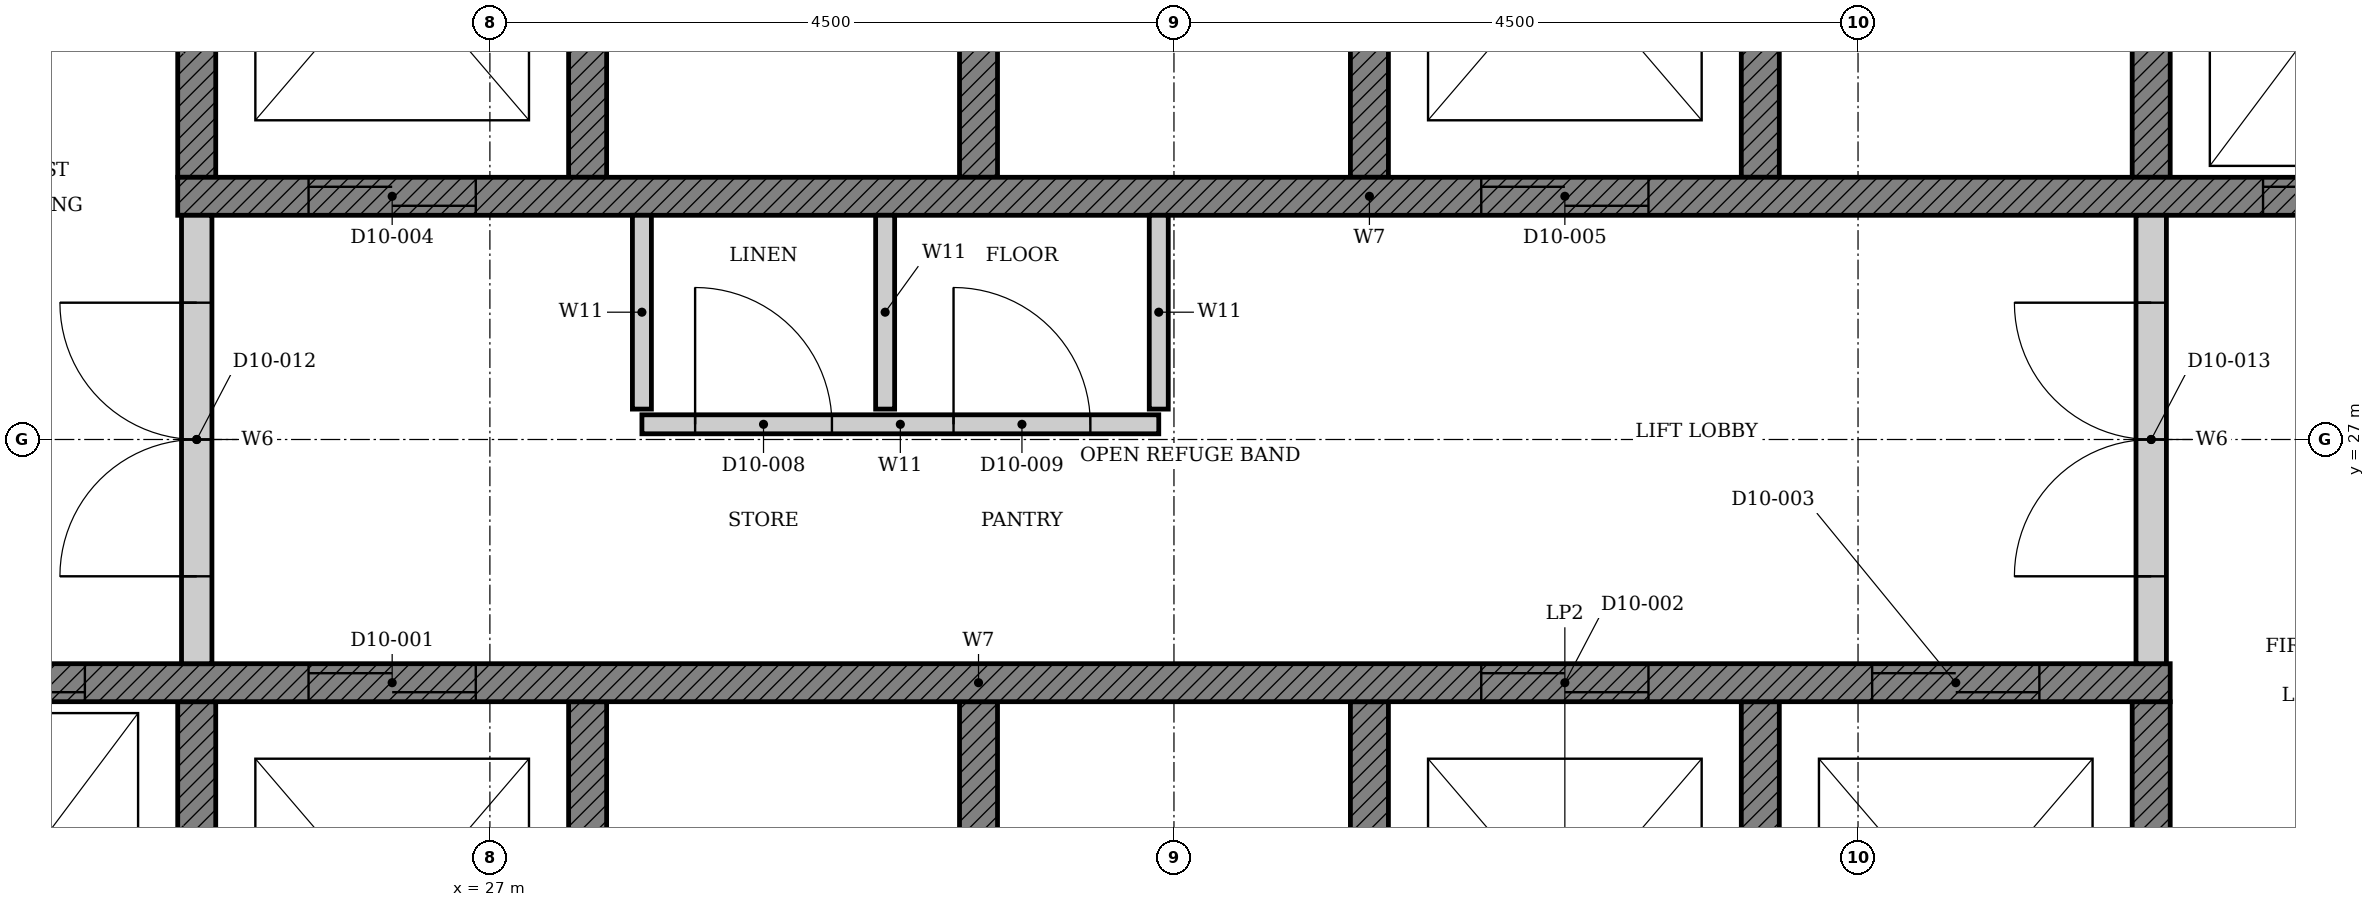
"""IFC4 building model, lengths in metres.
Left out: names, types, materials, properties, quantities, classifications, styles, units other than length and angle.
Written with IfcOpenShell. Run it as: python <this file> out.ifc"""

import sys

from ifc_helpers import new_model, si_unit, direction, frame, frame_2d, origin, place, context, subcontext, project, spatial, polyline, rectangle, outline, extrude, element, fill, save


model = new_model("IFC4")
c1 = context("Model", 3, precision=1e-05, world=origin(), true_north=direction((0.0, 1.0)))
c2 = subcontext(c1, "Body", "Model", "MODEL_VIEW")
j1 = project(units=[si_unit("LENGTHUNIT", "METRE"), si_unit("PLANEANGLEUNIT", "RADIAN")], contexts=[c1])
p1 = place(None, origin())
s1 = spatial("IfcSite", under=j1, at=p1, CompositionType="ELEMENT")
p2 = place(p1, origin())
s2 = spatial("IfcBuilding", under=s1, at=p2, CompositionType="ELEMENT")
p3 = place(p2, frame((0.0, 0.0, 48.0)))
s3 = spatial("IfcBuildingStorey", under=s2, at=p3, CompositionType="ELEMENT", Elevation=48.0)
p4 = place(p3, origin())
e1 = element("IfcWall", 1, at=p4, inside=s3, PredefinedType="SHEAR", context=c2, shape_type="SweptSolid", body=[
    extrude(outline(polyline([(22.375, 22.35), (38.053, 22.35), (38.053, 25.275), (37.803, 25.275), (37.803, 22.65), (35.482, 22.65), (35.482, 25.275), (35.232, 25.275), (35.232, 22.65), (32.911, 22.65), (32.911, 25.275), (32.661, 25.275), (32.661, 22.65), (30.339, 22.65), (30.339, 25.275), (30.089, 25.275), (30.089, 22.65), (27.768, 22.65), (27.768, 25.275), (27.518, 25.275), (27.518, 22.65), (25.197, 22.65), (25.197, 25.275), (24.947, 25.275), (24.947, 22.65), (22.625, 22.65), (22.625, 25.275), (22.375, 25.275), (22.375, 22.35)])), origin(), (0.0, 0.0, 1.0), 4.5),
])
p5 = place(p3, origin())
e2 = element("IfcWall", 2, at=p5, inside=s3, PredefinedType="SHEAR", context=c2, shape_type="SweptSolid", body=[
    extrude(outline(polyline([(24.947, 28.725), (25.197, 28.725), (25.197, 31.35), (27.518, 31.35), (27.518, 28.725), (27.768, 28.725), (27.768, 31.35), (30.089, 31.35), (30.089, 28.725), (30.339, 28.725), (30.339, 31.35), (32.661, 31.35), (32.661, 28.725), (32.911, 28.725), (32.911, 31.35), (35.232, 31.35), (35.232, 28.725), (35.482, 28.725), (35.482, 31.35), (37.803, 31.35), (37.803, 28.725), (38.053, 28.725), (38.053, 31.35), (40.375, 31.35), (40.375, 28.725), (40.625, 28.725), (40.625, 31.65), (24.947, 31.65), (24.947, 28.725)])), origin(), (0.0, 0.0, 1.0), 4.5),
])
p6 = place(p3, frame((22.375, 25.4, 0.0), z_axis=(0.0, 0.0, 1.0), x_axis=(1.0, 0.0, 0.0)))
e3 = element("IfcWall", 3, at=p6, inside=s3, PredefinedType="SHEAR", context=c2, shape_type="SweptSolid", body=[
    extrude(rectangle(XDim=15.678, YDim=0.25, at=frame_2d((7.839, 0.0))), origin(), (0.0, 0.0, 1.0), 4.5),
])
p7 = place(p6, frame((3.432, 0.0, 0.0)))
e4 = element("IfcOpeningElement", 4, at=p7, cuts=e3, PredefinedType="OPENING", context=c2, shape_type="SweptSolid", body=[
    extrude(rectangle(XDim=1.1, YDim=2.1, at=frame_2d((0.55, 1.05))), frame((0.0, 0.135, 0.0), z_axis=(0.0, -1.0, 0.0), x_axis=(1.0, 0.0, 0.0)), (0.0, 0.0, 1.0), 0.27),
])
p8 = place(p6, frame((11.146, 0.0, 0.0)))
e5 = element("IfcOpeningElement", 5, at=p8, cuts=e3, PredefinedType="OPENING", context=c2, shape_type="SweptSolid", body=[
    extrude(rectangle(XDim=1.1, YDim=2.1, at=frame_2d((0.55, 1.05))), frame((0.0, 0.135, 0.0), z_axis=(0.0, -1.0, 0.0), x_axis=(1.0, 0.0, 0.0)), (0.0, 0.0, 1.0), 0.27),
])
p9 = place(p6, frame((13.718, 0.0, 0.0)))
e6 = element("IfcOpeningElement", 6, at=p9, cuts=e3, PredefinedType="OPENING", context=c2, shape_type="SweptSolid", body=[
    extrude(rectangle(XDim=1.1, YDim=2.1, at=frame_2d((0.55, 1.05))), frame((0.0, 0.135, 0.0), z_axis=(0.0, -1.0, 0.0), x_axis=(1.0, 0.0, 0.0)), (0.0, 0.0, 1.0), 0.27),
])
p10 = place(p6, frame((0.861, 0.0, 0.0)))
e7 = element("IfcOpeningElement", 7, at=p10, cuts=e3, PredefinedType="OPENING", context=c2, shape_type="SweptSolid", body=[
    extrude(rectangle(XDim=1.1, YDim=2.1, at=frame_2d((0.55, 1.05))), frame((0.0, 0.135, 0.0), z_axis=(0.0, -1.0, 0.0), x_axis=(1.0, 0.0, 0.0)), (0.0, 0.0, 1.0), 0.27),
])
p11 = place(p3, frame((24.947, 28.6, 0.0), z_axis=(0.0, 0.0, 1.0), x_axis=(1.0, 0.0, 0.0)))
e8 = element("IfcWall", 8, at=p11, inside=s3, PredefinedType="SHEAR", context=c2, shape_type="SweptSolid", body=[
    extrude(rectangle(XDim=15.678, YDim=0.25, at=frame_2d((7.839, 0.0))), origin(), (0.0, 0.0, 1.0), 4.5),
])
p12 = place(p11, frame((0.861, 0.0, 0.0)))
e9 = element("IfcOpeningElement", 9, at=p12, cuts=e8, PredefinedType="OPENING", context=c2, shape_type="SweptSolid", body=[
    extrude(rectangle(XDim=1.1, YDim=2.1, at=frame_2d((0.55, 1.05))), frame((0.0, 0.135, 0.0), z_axis=(0.0, -1.0, 0.0), x_axis=(1.0, 0.0, 0.0)), (0.0, 0.0, 1.0), 0.27),
])
p13 = place(p11, frame((8.575, 0.0, 0.0)))
e10 = element("IfcOpeningElement", 10, at=p13, cuts=e8, PredefinedType="OPENING", context=c2, shape_type="SweptSolid", body=[
    extrude(rectangle(XDim=1.1, YDim=2.1, at=frame_2d((0.55, 1.05))), frame((0.0, 0.135, 0.0), z_axis=(0.0, -1.0, 0.0), x_axis=(1.0, 0.0, 0.0)), (0.0, 0.0, 1.0), 0.27),
])
p14 = place(p11, frame((13.718, 0.0, 0.0)))
e11 = element("IfcOpeningElement", 11, at=p14, cuts=e8, PredefinedType="OPENING", context=c2, shape_type="SweptSolid", body=[
    extrude(rectangle(XDim=1.1, YDim=2.1, at=frame_2d((0.55, 1.05))), frame((0.0, 0.135, 0.0), z_axis=(0.0, -1.0, 0.0), x_axis=(1.0, 0.0, 0.0)), (0.0, 0.0, 1.0), 0.27),
])
p15 = place(p3, frame((28.0, 27.1, 0.0), z_axis=(0.0, 0.0, 1.0), x_axis=(1.0, 0.0, 0.0)))
e12 = element("IfcWall", 12, at=p15, inside=s3, PredefinedType="PARTITIONING", context=c2, shape_type="SweptSolid", body=[
    extrude(rectangle(XDim=3.4, YDim=0.125, at=frame_2d((1.7, 0.0))), origin(), (0.0, 0.0, 1.0), 4.5),
])
p16 = place(p15, frame((0.35, 0.0, 0.0)))
e13 = element("IfcOpeningElement", 13, at=p16, cuts=e12, PredefinedType="OPENING", context=c2, shape_type="SweptSolid", body=[
    extrude(rectangle(XDim=0.9, YDim=2.1, at=frame_2d((0.45, 1.05))), frame((0.0, 0.073, 0.0), z_axis=(0.0, -1.0, 0.0), x_axis=(1.0, 0.0, 0.0)), (0.0, 0.0, 1.0), 0.145),
])
p17 = place(p15, frame((2.05, 0.0, 0.0)))
e14 = element("IfcOpeningElement", 14, at=p17, cuts=e12, PredefinedType="OPENING", context=c2, shape_type="SweptSolid", body=[
    extrude(rectangle(XDim=0.9, YDim=2.1, at=frame_2d((0.45, 1.05))), frame((0.0, 0.073, 0.0), z_axis=(0.0, -1.0, 0.0), x_axis=(1.0, 0.0, 0.0)), (0.0, 0.0, 1.0), 0.145),
])
for number, where, z_axis, x_axis in (
    (15, (28.0, 28.475, 0.0), (0.0, 0.0, 1.0), (0.0, -1.0, 0.0)),
    (16, (29.6, 28.475, 0.0), (0.0, 0.0, 1.0), (0.0, -1.0, 0.0)),
    (17, (31.4, 28.475, 0.0), (0.0, 0.0, 1.0), (0.0, -1.0, 0.0)),
):
    element("IfcWall", number, at=place(p3, frame(where, z_axis=z_axis, x_axis=x_axis)), inside=s3, PredefinedType="PARTITIONING", context=c2, shape_type="SweptSolid", body=[
        extrude(rectangle(XDim=1.275, YDim=0.125, at=frame_2d((0.638, 0.0))), origin(), (0.0, 0.0, 1.0), 4.5),
    ])
p18 = place(p3, frame((25.072, 25.525, 0.0), z_axis=(0.0, 0.0, 1.0), x_axis=(0.0, 1.0, 0.0)))
e18 = element("IfcWall", 18, at=p18, inside=s3, PredefinedType="PARTITIONING", context=c2, shape_type="SweptSolid", body=[
    extrude(rectangle(XDim=2.95, YDim=0.2, at=frame_2d((1.475, 0.0))), origin(), (0.0, 0.0, 1.0), 4.5),
])
p19 = place(p18, frame((0.575, 0.0, 0.0)))
e19 = element("IfcOpeningElement", 19, at=p19, cuts=e18, PredefinedType="OPENING", context=c2, shape_type="SweptSolid", body=[
    extrude(rectangle(XDim=1.8, YDim=2.1, at=frame_2d((0.9, 1.05))), frame((0.0, 0.11, 0.0), z_axis=(0.0, -1.0, 0.0), x_axis=(1.0, 0.0, 0.0)), (0.0, 0.0, 1.0), 0.22),
])
p20 = place(p3, frame((37.928, 25.525, 0.0), z_axis=(0.0, 0.0, 1.0), x_axis=(0.0, 1.0, 0.0)))
e20 = element("IfcWall", 20, at=p20, inside=s3, PredefinedType="PARTITIONING", context=c2, shape_type="SweptSolid", body=[
    extrude(rectangle(XDim=2.95, YDim=0.2, at=frame_2d((1.475, 0.0))), origin(), (0.0, 0.0, 1.0), 4.5),
])
p21 = place(p20, frame((0.575, 0.0, 0.0)))
e21 = element("IfcOpeningElement", 21, at=p21, cuts=e20, PredefinedType="OPENING", context=c2, shape_type="SweptSolid", body=[
    extrude(rectangle(XDim=1.8, YDim=2.1, at=frame_2d((0.9, 1.05))), frame((0.0, 0.11, 0.0), z_axis=(0.0, -1.0, 0.0), x_axis=(1.0, 0.0, 0.0)), (0.0, 0.0, 1.0), 0.22),
])
p22 = place(p7, origin())
e22 = element("IfcDoor", 22, at=p22, inside=s3, OperationType="DOUBLE_DOOR_SLIDING", PredefinedType="DOOR", context=c2, shape_type="SweptSolid", body=[
    extrude(rectangle(XDim=1.1, YDim=2.1, at=frame_2d((0.55, 1.05))), frame((0.0, 0.025, 0.0), z_axis=(0.0, -1.0, 0.0), x_axis=(1.0, 0.0, 0.0)), (0.0, 0.0, 1.0), 0.05),
])
fill(e4, e22)
p23 = place(p8, origin())
e23 = element("IfcDoor", 23, at=p23, inside=s3, OperationType="DOUBLE_DOOR_SLIDING", PredefinedType="DOOR", context=c2, shape_type="SweptSolid", body=[
    extrude(rectangle(XDim=1.1, YDim=2.1, at=frame_2d((0.55, 1.05))), frame((0.0, 0.025, 0.0), z_axis=(0.0, -1.0, 0.0), x_axis=(1.0, 0.0, 0.0)), (0.0, 0.0, 1.0), 0.05),
])
fill(e5, e23)
p24 = place(p9, origin())
e24 = element("IfcDoor", 24, at=p24, inside=s3, OperationType="DOUBLE_DOOR_SLIDING", PredefinedType="DOOR", context=c2, shape_type="SweptSolid", body=[
    extrude(rectangle(XDim=1.1, YDim=2.1, at=frame_2d((0.55, 1.05))), frame((0.0, 0.025, 0.0), z_axis=(0.0, -1.0, 0.0), x_axis=(1.0, 0.0, 0.0)), (0.0, 0.0, 1.0), 0.05),
])
fill(e6, e24)
p25 = place(p12, origin())
e25 = element("IfcDoor", 25, at=p25, inside=s3, OperationType="DOUBLE_DOOR_SLIDING", PredefinedType="DOOR", context=c2, shape_type="SweptSolid", body=[
    extrude(rectangle(XDim=1.1, YDim=2.1, at=frame_2d((0.55, 1.05))), frame((0.0, 0.025, 0.0), z_axis=(0.0, -1.0, 0.0), x_axis=(1.0, 0.0, 0.0)), (0.0, 0.0, 1.0), 0.05),
])
fill(e9, e25)
p26 = place(p13, origin())
e26 = element("IfcDoor", 26, at=p26, inside=s3, OperationType="DOUBLE_DOOR_SLIDING", PredefinedType="DOOR", context=c2, shape_type="SweptSolid", body=[
    extrude(rectangle(XDim=1.1, YDim=2.1, at=frame_2d((0.55, 1.05))), frame((0.0, 0.025, 0.0), z_axis=(0.0, -1.0, 0.0), x_axis=(1.0, 0.0, 0.0)), (0.0, 0.0, 1.0), 0.05),
])
fill(e10, e26)
p27 = place(p10, origin())
e27 = element("IfcDoor", 27, at=p27, inside=s3, OperationType="DOUBLE_DOOR_SLIDING", PredefinedType="DOOR", context=c2, shape_type="SweptSolid", body=[
    extrude(rectangle(XDim=1.1, YDim=2.1, at=frame_2d((0.55, 1.05))), frame((0.0, 0.025, 0.0), z_axis=(0.0, -1.0, 0.0), x_axis=(1.0, 0.0, 0.0)), (0.0, 0.0, 1.0), 0.05),
])
fill(e7, e27)
p28 = place(p14, origin())
e28 = element("IfcDoor", 28, at=p28, inside=s3, OperationType="DOUBLE_DOOR_SLIDING", PredefinedType="DOOR", context=c2, shape_type="SweptSolid", body=[
    extrude(rectangle(XDim=1.1, YDim=2.1, at=frame_2d((0.55, 1.05))), frame((0.0, 0.025, 0.0), z_axis=(0.0, -1.0, 0.0), x_axis=(1.0, 0.0, 0.0)), (0.0, 0.0, 1.0), 0.05),
])
fill(e11, e28)
p29 = place(p16, origin())
e29 = element("IfcDoor", 29, at=p29, inside=s3, OperationType="SINGLE_SWING_LEFT", PredefinedType="DOOR", context=c2, shape_type="SweptSolid", body=[
    extrude(rectangle(XDim=0.9, YDim=2.1, at=frame_2d((0.45, 1.05))), frame((0.0, 0.025, 0.0), z_axis=(0.0, -1.0, 0.0), x_axis=(1.0, 0.0, 0.0)), (0.0, 0.0, 1.0), 0.05),
])
fill(e13, e29)
p30 = place(p17, origin())
e30 = element("IfcDoor", 30, at=p30, inside=s3, OperationType="SINGLE_SWING_LEFT", PredefinedType="DOOR", context=c2, shape_type="SweptSolid", body=[
    extrude(rectangle(XDim=0.9, YDim=2.1, at=frame_2d((0.45, 1.05))), frame((0.0, 0.025, 0.0), z_axis=(0.0, -1.0, 0.0), x_axis=(1.0, 0.0, 0.0)), (0.0, 0.0, 1.0), 0.05),
])
fill(e14, e30)
p31 = place(p19, origin())
e31 = element("IfcDoor", 31, at=p31, inside=s3, OperationType="DOUBLE_DOOR_SINGLE_SWING", PredefinedType="DOOR", context=c2, shape_type="SweptSolid", body=[
    extrude(rectangle(XDim=1.8, YDim=2.1, at=frame_2d((0.9, 1.05))), frame((0.0, 0.025, 0.0), z_axis=(0.0, -1.0, 0.0), x_axis=(1.0, 0.0, 0.0)), (0.0, 0.0, 1.0), 0.05),
])
fill(e19, e31)
p32 = place(p21, origin())
e32 = element("IfcDoor", 32, at=p32, inside=s3, OperationType="DOUBLE_DOOR_SINGLE_SWING", PredefinedType="DOOR", context=c2, shape_type="SweptSolid", body=[
    extrude(rectangle(XDim=1.8, YDim=2.1, at=frame_2d((0.9, 1.05))), frame((0.0, 0.025, 0.0), z_axis=(0.0, -1.0, 0.0), x_axis=(1.0, 0.0, 0.0)), (0.0, 0.0, 1.0), 0.05),
])
fill(e21, e32)
save(model, sys.argv[1])
